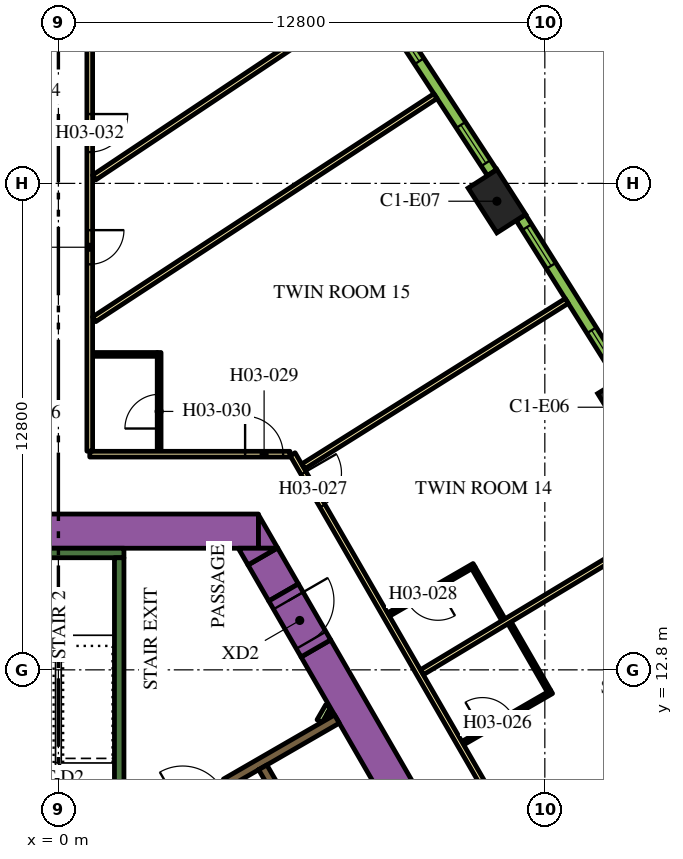
"""IFC4 building model, lengths in metres.
Left out: names, types, materials, properties, quantities, classifications, styles, units other than length and angle.
Written with IfcOpenShell. Run it as: python <this file> out.ifc"""

import sys

from ifc_helpers import new_model, si_unit, direction, frame, frame_2d, origin, origin_2d, place, context, subcontext, project, spatial, polyline, rectangle, outline, extrude, element, fill, save


model = new_model("IFC4")
c1 = context("Model", 3, precision=1e-05, world=origin(), true_north=direction((0.0, 1.0)))
c2 = subcontext(c1, "Body", "Model", "MODEL_VIEW")
j1 = project(units=[si_unit("LENGTHUNIT", "METRE"), si_unit("PLANEANGLEUNIT", "RADIAN")], contexts=[c1])
p1 = place(None, origin())
s1 = spatial("IfcSite", under=j1, at=p1, CompositionType="ELEMENT")
p2 = place(p1, origin())
s2 = spatial("IfcBuilding", under=s1, at=p2, CompositionType="ELEMENT")
p3 = place(p2, frame((0.0, 0.0, 51.0)))
s3 = spatial("IfcBuildingStorey", under=s2, at=p3, CompositionType="ELEMENT", Elevation=51.0)
for number, where, z_axis, x_axis in (
    (1, (14.942, 19.71, 0.0), (0.0, 0.0, 1.0), (-0.524, 0.852, 0.0)),
    (2, (11.539, 25.131, 0.0), (0.0, 0.0, 1.0), (-0.539, 0.842, 0.0)),
):
    element("IfcColumn", number, at=place(p3, frame(where, z_axis=z_axis, x_axis=x_axis)), inside=s3, PredefinedType="COLUMN", context=c2, shape_type="SweptSolid", body=[
        extrude(rectangle(XDim=1.4, YDim=0.9, at=origin_2d()), origin(), (0.0, 0.0, 1.0), 3.9),
    ])
p4 = place(p3, frame((6.776, 13.364, 0.0), z_axis=(0.0, 0.0, 1.0), x_axis=(0.500004177138, -0.8660229921, 0.0)))
e3 = element("IfcWall", 3, at=p4, inside=s3, PredefinedType="SOLIDWALL", context=c2, shape_type="SweptSolid", body=[
    extrude(rectangle(XDim=20.204, YDim=0.9, at=frame_2d((10.102, 0.0))), origin(), (0.0, 0.0, 1.0), 3.9),
])
p5 = place(p3, frame((-4.224, 16.45, 0.0), z_axis=(0.0, 0.0, 1.0), x_axis=(1.0, 0.0, 0.0)))
e4 = element("IfcWall", 4, at=p5, inside=s3, PredefinedType="SOLIDWALL", context=c2, shape_type="SweptSolid", body=[
    extrude(rectangle(XDim=9.488, YDim=0.9, at=frame_2d((4.744, 0.0))), origin(), (0.0, 0.0, 1.0), 3.9),
])
p6 = place(p3, origin())
e5 = element("IfcWall", 5, at=p6, inside=s3, PredefinedType="SOLIDWALL", context=c2, shape_type="SweptSolid", body=[
    extrude(outline(polyline([(5.265, 16.0), (5.265, 16.88), (5.773, 16.0), (5.265, 16.0)])), origin(), (0.0, 0.0, 1.0), 3.9),
])
p7 = place(p3, frame((5.926, 14.836, 0.0), z_axis=(0.0, 0.0, 1.0), x_axis=(-0.500076735116, 0.865981096212, 0.0)))
e6 = element("IfcWall", 6, at=p7, inside=s3, PredefinedType="SOLIDWALL", context=c2, shape_type="SweptSolid", body=[
    extrude(rectangle(XDim=1.094, YDim=0.9, at=frame_2d((0.547, 0.0))), origin(), (0.0, 0.0, 1.0), 3.9),
])
e7 = element("IfcWall", 7, at=p6, inside=s3, PredefinedType="SOLIDWALL", context=c2, shape_type="SweptSolid", body=[
    extrude(outline(polyline([(4.734, 16.0), (5.75, 16.0), (4.988, 15.56), (4.734, 16.0)])), origin(), (0.0, 0.0, 1.0), 3.9),
])
p8 = place(p3, frame((-1.725, 15.875, 0.0), z_axis=(0.0, 0.0, 1.0), x_axis=(1.0, 0.0, 0.0)))
e8 = element("IfcWall", 8, at=p8, inside=s3, PredefinedType="SOLIDWALL", context=c2, shape_type="SweptSolid", body=[
    extrude(rectangle(XDim=3.45, YDim=0.25, at=frame_2d((1.725, 0.0))), origin(), (0.0, 0.0, 1.0), 3.9),
])
p9 = place(p3, frame((1.6, 8.95, 0.0), z_axis=(0.0, 0.0, 1.0), x_axis=(0.0, 1.0, 0.0)))
e9 = element("IfcWall", 9, at=p9, inside=s3, PredefinedType="SOLIDWALL", context=c2, shape_type="SweptSolid", body=[
    extrude(rectangle(XDim=6.8, YDim=0.25, at=frame_2d((3.4, 0.0))), origin(), (0.0, 0.0, 1.0), 3.9),
])
e10 = element("IfcWall", 10, at=p6, inside=s3, PredefinedType="SOLIDWALL", context=c2, shape_type="SweptSolid", body=[
    extrude(outline(polyline([(5.27, 10.173), (5.27, 10.173), (4.683, 9.834), (4.504, 9.731), (4.442, 9.839), (4.431, 9.856), (4.419, 9.871), (4.406, 9.885), (4.39, 9.898), (4.374, 9.909), (4.357, 9.918), (4.341, 9.925), (7.266, 11.614), (7.391, 11.398), (5.486, 10.298), (5.486, 10.298), (5.27, 10.173), (5.27, 10.173)])), origin(), (0.0, 0.0, 1.0), 3.9),
])
p10 = place(p3, frame((6.872, 11.45, 0.0), z_axis=(0.0, 0.0, 1.0), x_axis=(0.499846793097, 0.866113839764, 0.0)))
e11 = element("IfcWall", 11, at=p10, inside=s3, PredefinedType="PARTITIONING", context=c2, shape_type="SweptSolid", body=[
    extrude(rectangle(XDim=0.453, YDim=0.15, at=frame_2d((0.227, 0.0))), origin(), (0.0, 0.0, 1.0), 2.75),
])
p11 = place(p3, frame((7.131, 11.6, 0.0), z_axis=(0.0, 0.0, 1.0), x_axis=(0.498600033135, 0.866832167699, 0.0)))
e12 = element("IfcWall", 12, at=p11, inside=s3, PredefinedType="PARTITIONING", context=c2, shape_type="SweptSolid", body=[
    extrude(rectangle(XDim=0.107, YDim=0.15, at=frame_2d((0.053, 0.0))), origin(), (0.0, 0.0, 1.0), 2.75),
])
p12 = place(p3, frame((11.553, -0.46, 0.0), z_axis=(0.0, 0.0, 1.0), x_axis=(-0.500006514828, 0.866021642414, 0.0)))
e13 = element("IfcWall", 13, at=p12, inside=s3, PredefinedType="SOLIDWALL", context=c2, shape_type="SweptSolid", body=[
    extrude(rectangle(XDim=12.35, YDim=0.25, at=frame_2d((6.175, 0.0))), origin(), (0.0, 0.0, 1.0), 3.9),
])
p13 = place(p12, frame((0.585, 0.0, 0.0)))
e14 = element("IfcOpeningElement", 14, at=p13, cuts=e13, PredefinedType="OPENING", context=c2, shape_type="SweptSolid", body=[
    extrude(rectangle(XDim=1.1, YDim=2.1, at=frame_2d((0.55, 1.05))), frame((0.0, 0.135, 0.0), z_axis=(0.0, -1.0, 0.0), x_axis=(1.0, 0.0, 0.0)), (0.0, 0.0, 1.0), 0.27),
])
p14 = place(p12, frame((3.105, 0.0, 0.0)))
e15 = element("IfcOpeningElement", 15, at=p14, cuts=e13, PredefinedType="OPENING", context=c2, shape_type="SweptSolid", body=[
    extrude(rectangle(XDim=1.1, YDim=2.1, at=frame_2d((0.55, 1.05))), frame((0.0, 0.135, 0.0), z_axis=(0.0, -1.0, 0.0), x_axis=(1.0, 0.0, 0.0)), (0.0, 0.0, 1.0), 0.27),
])
p15 = place(p12, frame((5.625, 0.0, 0.0)))
e16 = element("IfcOpeningElement", 16, at=p15, cuts=e13, PredefinedType="OPENING", context=c2, shape_type="SweptSolid", body=[
    extrude(rectangle(XDim=1.1, YDim=2.1, at=frame_2d((0.55, 1.05))), frame((0.0, 0.135, 0.0), z_axis=(0.0, -1.0, 0.0), x_axis=(1.0, 0.0, 0.0)), (0.0, 0.0, 1.0), 0.27),
])
p16 = place(p3, frame((5.926, 14.836, 0.0), z_axis=(0.0, 0.0, 1.0), x_axis=(0.500062241894, -0.865989465428, 0.0)))
e17 = element("IfcWall", 17, at=p16, inside=s3, PredefinedType="SOLIDWALL", context=c2, shape_type="SweptSolid", body=[
    extrude(rectangle(XDim=1.7, YDim=0.9, at=frame_2d((0.85, 0.0))), origin(), (0.0, 0.0, 1.0), 3.9),
])
p17 = place(p16, frame((0.25, 0.0, 0.0)))
e18 = element("IfcOpeningElement", 18, at=p17, cuts=e17, PredefinedType="OPENING", context=c2, shape_type="SweptSolid", body=[
    extrude(rectangle(XDim=1.2, YDim=2.1, at=frame_2d((0.6, 1.05))), frame((0.0, 0.46, 0.0), z_axis=(0.0, -1.0, 0.0), x_axis=(1.0, 0.0, 0.0)), (0.0, 0.0, 1.0), 0.92),
])
p18 = place(p3, frame((6.163, 18.475, 0.0), z_axis=(0.0, 0.0, 1.0), x_axis=(0.500001317485, -0.866024643133, 0.0)))
e19 = element("IfcWall", 19, at=p18, inside=s3, PredefinedType="PARTITIONING", context=c2, shape_type="SweptSolid", body=[
    extrude(rectangle(XDim=25.767, YDim=0.15, at=frame_2d((12.883, 0.0))), origin(), (0.0, 0.0, 1.0), 2.75),
])
p19 = place(p18, frame((24.586, 0.0, 0.0)))
e20 = element("IfcOpeningElement", 20, at=p19, cuts=e19, PredefinedType="OPENING", context=c2, shape_type="SweptSolid", body=[
    extrude(rectangle(XDim=1.0, YDim=2.1, at=frame_2d((0.5, 1.05))), frame((0.0, 0.085, 0.0), z_axis=(0.0, -1.0, 0.0), x_axis=(1.0, 0.0, 0.0)), (0.0, 0.0, 1.0), 0.17),
])
p20 = place(p18, frame((13.144, 0.0, 0.0)))
e21 = element("IfcOpeningElement", 21, at=p20, cuts=e19, PredefinedType="OPENING", context=c2, shape_type="SweptSolid", body=[
    extrude(rectangle(XDim=1.0, YDim=2.1, at=frame_2d((0.5, 1.05))), frame((0.0, 0.085, 0.0), z_axis=(0.0, -1.0, 0.0), x_axis=(1.0, 0.0, 0.0)), (0.0, 0.0, 1.0), 0.17),
])
p21 = place(p18, frame((11.692, 0.0, 0.0)))
e22 = element("IfcOpeningElement", 22, at=p21, cuts=e19, PredefinedType="OPENING", context=c2, shape_type="SweptSolid", body=[
    extrude(rectangle(XDim=1.0, YDim=2.1, at=frame_2d((0.5, 1.05))), frame((0.0, 0.085, 0.0), z_axis=(0.0, -1.0, 0.0), x_axis=(1.0, 0.0, 0.0)), (0.0, 0.0, 1.0), 0.17),
])
p22 = place(p18, frame((0.572, 0.0, 0.0)))
e23 = element("IfcOpeningElement", 23, at=p22, cuts=e19, PredefinedType="OPENING", context=c2, shape_type="SweptSolid", body=[
    extrude(rectangle(XDim=1.0, YDim=2.1, at=frame_2d((0.5, 1.05))), frame((0.0, 0.085, 0.0), z_axis=(0.0, -1.0, 0.0), x_axis=(1.0, 0.0, 0.0)), (0.0, 0.0, 1.0), 0.17),
])
p23 = place(p3, frame((0.825, 18.475, 0.0), z_axis=(0.0, 0.0, 1.0), x_axis=(1.0, 0.0, 0.0)))
e24 = element("IfcWall", 24, at=p23, inside=s3, PredefinedType="PARTITIONING", context=c2, shape_type="SweptSolid", body=[
    extrude(rectangle(XDim=5.268, YDim=0.15, at=frame_2d((2.634, 0.0))), origin(), (0.0, 0.0, 1.0), 2.75),
])
p24 = place(p23, frame((4.088, 0.0, 0.0)))
e25 = element("IfcOpeningElement", 25, at=p24, cuts=e24, PredefinedType="OPENING", context=c2, shape_type="SweptSolid", body=[
    extrude(rectangle(XDim=1.0, YDim=2.1, at=frame_2d((0.5, 1.05))), frame((0.0, 0.085, 0.0), z_axis=(0.0, -1.0, 0.0), x_axis=(1.0, 0.0, 0.0)), (0.0, 0.0, 1.0), 0.17),
])
p25 = place(p3, frame((0.825, 34.699, 0.0), z_axis=(0.0, 0.0, 1.0), x_axis=(0.0, -1.0, 0.0)))
e26 = element("IfcWall", 26, at=p25, inside=s3, PredefinedType="PARTITIONING", context=c2, shape_type="SweptSolid", body=[
    extrude(rectangle(XDim=16.144, YDim=0.15, at=frame_2d((8.072, 0.0))), origin(), (0.0, 0.0, 1.0), 2.75),
])
p26 = place(p25, frame((10.329, 0.0, 0.0)))
e27 = element("IfcOpeningElement", 27, at=p26, cuts=e26, PredefinedType="OPENING", context=c2, shape_type="SweptSolid", body=[
    extrude(rectangle(XDim=0.9, YDim=2.1, at=frame_2d((0.45, 1.05))), frame((0.0, 0.085, 0.0), z_axis=(0.0, -1.0, 0.0), x_axis=(1.0, 0.0, 0.0)), (0.0, 0.0, 1.0), 0.17),
])
p27 = place(p25, frame((7.275, 0.0, 0.0)))
e28 = element("IfcOpeningElement", 28, at=p27, cuts=e26, PredefinedType="OPENING", context=c2, shape_type="SweptSolid", body=[
    extrude(rectangle(XDim=1.0, YDim=2.1, at=frame_2d((0.5, 1.05))), frame((0.0, 0.085, 0.0), z_axis=(0.0, -1.0, 0.0), x_axis=(1.0, 0.0, 0.0)), (0.0, 0.0, 1.0), 0.17),
])
p28 = place(p3, frame((9.922, 27.896, 0.0), z_axis=(0.0, 0.0, 1.0), x_axis=(-0.836970816595, -0.547247523675, 0.0)))
e29 = element("IfcWall", 29, at=p28, inside=s3, PredefinedType="PARTITIONING", context=c2, shape_type="SweptSolid", body=[
    extrude(rectangle(XDim=10.729, YDim=0.15, at=frame_2d((5.364, 0.0))), origin(), (0.0, 0.0, 1.0), 2.75),
])
p29 = place(p3, frame((7.662, 30.238, 0.0), z_axis=(0.0, 0.0, 1.0), x_axis=(-0.831882886825, -0.554951225431, 0.0)))
e30 = element("IfcWall", 30, at=p29, inside=s3, PredefinedType="PARTITIONING", context=c2, shape_type="SweptSolid", body=[
    extrude(rectangle(XDim=8.079, YDim=0.15, at=frame_2d((4.04, 0.0))), origin(), (0.0, 0.0, 1.0), 2.75),
])
p30 = place(p3, frame((13.376, 22.506, 0.0), z_axis=(0.0, 0.0, 1.0), x_axis=(-0.846945608893, -0.531679542183, 0.0)))
e31 = element("IfcWall", 31, at=p30, inside=s3, PredefinedType="PARTITIONING", context=c2, shape_type="SweptSolid", body=[
    extrude(rectangle(XDim=8.182, YDim=0.15, at=frame_2d((4.091, 0.0))), origin(), (0.0, 0.0, 1.0), 2.75),
])
p31 = place(p3, frame((16.729, 17.052, 0.0), z_axis=(0.0, 0.0, 1.0), x_axis=(-0.856630606266, -0.515930232113, 0.0)))
e32 = element("IfcWall", 32, at=p31, inside=s3, PredefinedType="PARTITIONING", context=c2, shape_type="SweptSolid", body=[
    extrude(rectangle(XDim=8.355, YDim=0.15, at=frame_2d((4.178, 0.0))), origin(), (0.0, 0.0, 1.0), 2.75),
])
p32 = place(p3, frame((19.982, 11.537, 0.0), z_axis=(0.0, 0.0, 1.0), x_axis=(-0.866020994654, -0.500007636761, 0.0)))
e33 = element("IfcWall", 33, at=p32, inside=s3, PredefinedType="PARTITIONING", context=c2, shape_type="SweptSolid", body=[
    extrude(rectangle(XDim=8.423, YDim=0.15, at=frame_2d((4.211, 0.0))), origin(), (0.0, 0.0, 1.0), 2.75),
])
p33 = place(p3, frame((10.64, 10.871, 0.0), z_axis=(0.0, 0.0, 1.0), x_axis=(0.866036505625, 0.499980770555, 0.0)))
e34 = element("IfcWall", 34, at=p33, inside=s3, PredefinedType="PARTITIONING", context=c2, shape_type="SweptSolid", body=[
    extrude(rectangle(XDim=2.7, YDim=0.1, at=frame_2d((1.35, 0.0))), origin(), (0.0, 0.0, 1.0), 2.75),
])
p34 = place(p33, frame((0.6, 0.0, 0.0)))
e35 = element("IfcOpeningElement", 35, at=p34, cuts=e34, PredefinedType="OPENING", context=c2, shape_type="SweptSolid", body=[
    extrude(rectangle(XDim=0.9, YDim=2.1, at=frame_2d((0.45, 1.05))), frame((0.0, 0.06, 0.0), z_axis=(0.0, -1.0, 0.0), x_axis=(1.0, 0.0, 0.0)), (0.0, 0.0, 1.0), 0.12),
])
p35 = place(p3, frame((12.91, 12.239, 0.0), z_axis=(0.0, 0.0, 1.0), x_axis=(-0.499957272447, 0.866050071143, 0.0)))
e36 = element("IfcWall", 36, at=p35, inside=s3, PredefinedType="PARTITIONING", context=c2, shape_type="SweptSolid", body=[
    extrude(rectangle(XDim=2.07, YDim=0.1, at=frame_2d((1.035, 0.0))), origin(), (0.0, 0.0, 1.0), 2.75),
])
p36 = place(p3, frame((10.938, 15.554, 0.0), z_axis=(0.0, 0.0, 1.0), x_axis=(-0.866062058628, -0.499936506574, 0.0)))
e37 = element("IfcWall", 37, at=p36, inside=s3, PredefinedType="PARTITIONING", context=c2, shape_type="SweptSolid", body=[
    extrude(rectangle(XDim=2.6, YDim=0.1, at=frame_2d((1.3, 0.0))), origin(), (0.0, 0.0, 1.0), 2.75),
])
p37 = place(p36, frame((1.1, 0.0, 0.0)))
e38 = element("IfcOpeningElement", 38, at=p37, cuts=e37, PredefinedType="OPENING", context=c2, shape_type="SweptSolid", body=[
    extrude(rectangle(XDim=0.9, YDim=2.1, at=frame_2d((0.45, 1.05))), frame((0.0, 0.06, 0.0), z_axis=(0.0, -1.0, 0.0), x_axis=(1.0, 0.0, 0.0)), (0.0, 0.0, 1.0), 0.12),
])
p38 = place(p3, frame((10.92, 15.486, 0.0), z_axis=(0.0, 0.0, 1.0), x_axis=(0.499994407638, -0.866028632512, 0.0)))
e39 = element("IfcWall", 39, at=p38, inside=s3, PredefinedType="PARTITIONING", context=c2, shape_type="SweptSolid", body=[
    extrude(rectangle(XDim=1.58, YDim=0.1, at=frame_2d((0.79, 0.0))), origin(), (0.0, 0.0, 1.0), 2.75),
])
p39 = place(p3, frame((2.651, 18.55, 0.0), z_axis=(0.0, 0.0, 1.0), x_axis=(0.0, 1.0, 0.0)))
e40 = element("IfcWall", 40, at=p39, inside=s3, PredefinedType="PARTITIONING", context=c2, shape_type="SweptSolid", body=[
    extrude(rectangle(XDim=2.6, YDim=0.1, at=frame_2d((1.3, 0.0))), origin(), (0.0, 0.0, 1.0), 2.75),
])
p40 = place(p39, frame((0.6, 0.0, 0.0)))
e41 = element("IfcOpeningElement", 41, at=p40, cuts=e40, PredefinedType="OPENING", context=c2, shape_type="SweptSolid", body=[
    extrude(rectangle(XDim=0.9, YDim=2.1, at=frame_2d((0.45, 1.05))), frame((0.0, 0.06, 0.0), z_axis=(0.0, -1.0, 0.0), x_axis=(1.0, 0.0, 0.0)), (0.0, 0.0, 1.0), 0.12),
])
p41 = place(p3, frame((2.601, 21.1, 0.0), z_axis=(0.0, 0.0, 1.0), x_axis=(-1.0, 0.0, 0.0)))
e42 = element("IfcWall", 42, at=p41, inside=s3, PredefinedType="PARTITIONING", context=c2, shape_type="SweptSolid", body=[
    extrude(rectangle(XDim=1.7, YDim=0.1, at=frame_2d((0.85, 0.0))), origin(), (0.0, 0.0, 1.0), 2.75),
])
p42 = place(p3, frame((14.827, 20.466, 0.0), z_axis=(0.0, 0.0, 1.0), x_axis=(-0.531688286542, 0.846940119462, 0.0)))
e43 = element("IfcWall", 43, at=p42, inside=s3, PredefinedType="SOLIDWALL", context=c2, shape_type="SweptSolid", body=[
    extrude(rectangle(XDim=4.998, YDim=0.29, at=frame_2d((2.499, 0.0))), origin(), (0.0, 0.0, 1.0), 3.65),
])
p43 = place(p42, frame((0.297, 0.0, 0.9)))
e44 = element("IfcOpeningElement", 44, at=p43, cuts=e43, PredefinedType="OPENING", context=c2, shape_type="SweptSolid", body=[
    extrude(rectangle(XDim=1.2, YDim=2.15, at=frame_2d((0.6, 1.075))), frame((0.0, 0.155, 0.0), z_axis=(0.0, -1.0, 0.0), x_axis=(1.0, 0.0, 0.0)), (0.0, 0.0, 1.0), 0.31),
])
p44 = place(p42, frame((3.501, 0.0, 0.9)))
e45 = element("IfcOpeningElement", 45, at=p44, cuts=e43, PredefinedType="OPENING", context=c2, shape_type="SweptSolid", body=[
    extrude(rectangle(XDim=1.2, YDim=2.15, at=frame_2d((0.6, 1.075))), frame((0.0, 0.155, 0.0), z_axis=(0.0, -1.0, 0.0), x_axis=(1.0, 0.0, 0.0)), (0.0, 0.0, 1.0), 0.31),
])
p45 = place(p3, frame((11.411, 25.884, 0.0), z_axis=(0.0, 0.0, 1.0), x_axis=(-0.547204617628, 0.836998868845, 0.0)))
e46 = element("IfcWall", 46, at=p45, inside=s3, PredefinedType="SOLIDWALL", context=c2, shape_type="SweptSolid", body=[
    extrude(rectangle(XDim=4.998, YDim=0.29, at=frame_2d((2.499, 0.0))), origin(), (0.0, 0.0, 1.0), 3.65),
])
p46 = place(p45, frame((0.297, 0.0, 0.9)))
e47 = element("IfcOpeningElement", 47, at=p46, cuts=e46, PredefinedType="OPENING", context=c2, shape_type="SweptSolid", body=[
    extrude(rectangle(XDim=1.2, YDim=2.15, at=frame_2d((0.6, 1.075))), frame((0.0, 0.155, 0.0), z_axis=(0.0, -1.0, 0.0), x_axis=(1.0, 0.0, 0.0)), (0.0, 0.0, 1.0), 0.31),
])
p47 = place(p45, frame((3.501, 0.0, 0.9)))
e48 = element("IfcOpeningElement", 48, at=p47, cuts=e46, PredefinedType="OPENING", context=c2, shape_type="SweptSolid", body=[
    extrude(rectangle(XDim=1.2, YDim=2.15, at=frame_2d((0.6, 1.075))), frame((0.0, 0.155, 0.0), z_axis=(0.0, -1.0, 0.0), x_axis=(1.0, 0.0, 0.0)), (0.0, 0.0, 1.0), 0.31),
])
p48 = place(p17, origin())
e49 = element("IfcDoor", 49, at=p48, inside=s3, OperationType="SINGLE_SWING_LEFT", PredefinedType="DOOR", context=c2, shape_type="SweptSolid", body=[
    extrude(rectangle(XDim=1.2, YDim=2.1, at=frame_2d((0.6, 1.05))), frame((0.0, 0.025, 0.0), z_axis=(0.0, -1.0, 0.0), x_axis=(1.0, 0.0, 0.0)), (0.0, 0.0, 1.0), 0.05),
])
fill(e18, e49)
p49 = place(p34, origin())
e50 = element("IfcDoor", 50, at=p49, inside=s3, OperationType="SINGLE_SWING_LEFT", PredefinedType="DOOR", context=c2, shape_type="SweptSolid", body=[
    extrude(rectangle(XDim=0.9, YDim=2.1, at=frame_2d((0.45, 1.05))), frame((0.0, 0.025, 0.0), z_axis=(0.0, -1.0, 0.0), x_axis=(1.0, 0.0, 0.0)), (0.0, 0.0, 1.0), 0.05),
])
fill(e35, e50)
p50 = place(p22, origin())
e51 = element("IfcDoor", 51, at=p50, inside=s3, OperationType="SINGLE_SWING_LEFT", PredefinedType="DOOR", context=c2, shape_type="SweptSolid", body=[
    extrude(rectangle(XDim=1.0, YDim=2.1, at=frame_2d((0.5, 1.05))), frame((0.0, 0.025, 0.0), z_axis=(0.0, -1.0, 0.0), x_axis=(1.0, 0.0, 0.0)), (0.0, 0.0, 1.0), 0.05),
])
fill(e23, e51)
p51 = place(p37, origin())
e52 = element("IfcDoor", 52, at=p51, inside=s3, OperationType="SINGLE_SWING_LEFT", PredefinedType="DOOR", context=c2, shape_type="SweptSolid", body=[
    extrude(rectangle(XDim=0.9, YDim=2.1, at=frame_2d((0.45, 1.05))), frame((0.0, 0.025, 0.0), z_axis=(0.0, -1.0, 0.0), x_axis=(1.0, 0.0, 0.0)), (0.0, 0.0, 1.0), 0.05),
])
fill(e38, e52)
p52 = place(p24, origin())
e53 = element("IfcDoor", 53, at=p52, inside=s3, OperationType="SINGLE_SWING_RIGHT", PredefinedType="DOOR", context=c2, shape_type="SweptSolid", body=[
    extrude(rectangle(XDim=1.0, YDim=2.1, at=frame_2d((0.5, 1.05))), frame((0.0, 0.025, 0.0), z_axis=(0.0, -1.0, 0.0), x_axis=(1.0, 0.0, 0.0)), (0.0, 0.0, 1.0), 0.05),
])
fill(e25, e53)
p53 = place(p40, origin())
e54 = element("IfcDoor", 54, at=p53, inside=s3, OperationType="SINGLE_SWING_RIGHT", PredefinedType="DOOR", context=c2, shape_type="SweptSolid", body=[
    extrude(rectangle(XDim=0.9, YDim=2.1, at=frame_2d((0.45, 1.05))), frame((0.0, 0.025, 0.0), z_axis=(0.0, -1.0, 0.0), x_axis=(1.0, 0.0, 0.0)), (0.0, 0.0, 1.0), 0.05),
])
fill(e41, e54)
p54 = place(p26, origin())
e55 = element("IfcDoor", 55, at=p54, inside=s3, OperationType="SINGLE_SWING_RIGHT", PredefinedType="DOOR", context=c2, shape_type="SweptSolid", body=[
    extrude(rectangle(XDim=0.9, YDim=2.1, at=frame_2d((0.45, 1.05))), frame((0.0, 0.025, 0.0), z_axis=(0.0, -1.0, 0.0), x_axis=(1.0, 0.0, 0.0)), (0.0, 0.0, 1.0), 0.05),
])
fill(e27, e55)
p55 = place(p27, origin())
e56 = element("IfcDoor", 56, at=p55, inside=s3, OperationType="SINGLE_SWING_RIGHT", PredefinedType="DOOR", context=c2, shape_type="SweptSolid", body=[
    extrude(rectangle(XDim=1.0, YDim=2.1, at=frame_2d((0.5, 1.05))), frame((0.0, 0.025, 0.0), z_axis=(0.0, -1.0, 0.0), x_axis=(1.0, 0.0, 0.0)), (0.0, 0.0, 1.0), 0.05),
])
fill(e28, e56)
p56 = place(p43, origin())
e57 = element("IfcWindow", 57, at=p56, inside=s3, PartitioningType="DOUBLE_PANEL_VERTICAL", PredefinedType="WINDOW", context=c2, shape_type="SweptSolid", body=[
    extrude(rectangle(XDim=1.2, YDim=2.15, at=frame_2d((0.6, 1.075))), frame((0.0, 0.015, 0.0), z_axis=(0.0, -1.0, 0.0), x_axis=(1.0, 0.0, 0.0)), (0.0, 0.0, 1.0), 0.06),
])
fill(e44, e57)
p57 = place(p44, origin())
e58 = element("IfcWindow", 58, at=p57, inside=s3, PartitioningType="DOUBLE_PANEL_VERTICAL", PredefinedType="WINDOW", context=c2, shape_type="SweptSolid", body=[
    extrude(rectangle(XDim=1.2, YDim=2.15, at=frame_2d((0.6, 1.075))), frame((0.0, 0.015, 0.0), z_axis=(0.0, -1.0, 0.0), x_axis=(1.0, 0.0, 0.0)), (0.0, 0.0, 1.0), 0.06),
])
fill(e45, e58)
p58 = place(p46, origin())
e59 = element("IfcWindow", 59, at=p58, inside=s3, PartitioningType="DOUBLE_PANEL_VERTICAL", PredefinedType="WINDOW", context=c2, shape_type="SweptSolid", body=[
    extrude(rectangle(XDim=1.2, YDim=2.15, at=frame_2d((0.6, 1.075))), frame((0.0, 0.015, 0.0), z_axis=(0.0, -1.0, 0.0), x_axis=(1.0, 0.0, 0.0)), (0.0, 0.0, 1.0), 0.06),
])
fill(e47, e59)
p59 = place(p47, origin())
e60 = element("IfcWindow", 60, at=p59, inside=s3, PartitioningType="DOUBLE_PANEL_VERTICAL", PredefinedType="WINDOW", context=c2, shape_type="SweptSolid", body=[
    extrude(rectangle(XDim=1.2, YDim=2.15, at=frame_2d((0.6, 1.075))), frame((0.0, 0.015, 0.0), z_axis=(0.0, -1.0, 0.0), x_axis=(1.0, 0.0, 0.0)), (0.0, 0.0, 1.0), 0.06),
])
fill(e48, e60)
save(model, sys.argv[1])
